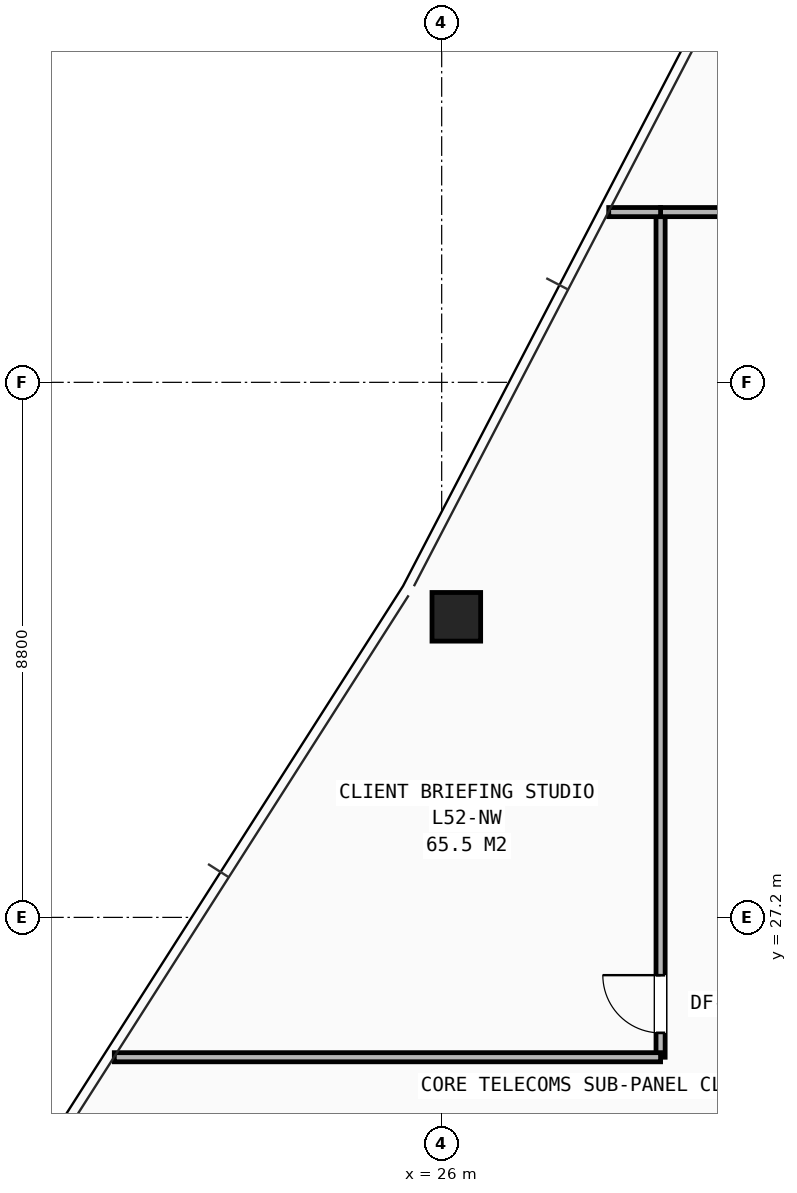
"""IFC4 building model, lengths in metres.
Left out: names, types, materials, properties, quantities, classifications, styles, units other than length and angle.
Written with IfcOpenShell. Run it as: python <this file> out.ifc"""

import sys

from ifc_helpers import new_model, si_unit, direction, frame, frame_2d, origin, origin_2d, place, context, subcontext, project, spatial, rectangle, hollow_rectangle, extrude, element, fill, save


model = new_model("IFC4")
c1 = context("Model", 3, precision=1e-05, world=origin(), true_north=direction((0.0, 1.0)))
c2 = subcontext(c1, "Body", "Model", "MODEL_VIEW")
j1 = project(units=[si_unit("LENGTHUNIT", "METRE"), si_unit("PLANEANGLEUNIT", "RADIAN")], contexts=[c1])
p1 = place(None, origin())
s1 = spatial("IfcSite", under=j1, at=p1, CompositionType="ELEMENT")
p2 = place(p1, origin())
s2 = spatial("IfcBuilding", under=s1, at=p2, CompositionType="ELEMENT")
p3 = place(p2, frame((0.0, 0.0, 182.7)))
s3 = spatial("IfcBuildingStorey", under=s2, at=p3, CompositionType="ELEMENT", Elevation=182.7)
p4 = place(p3, frame((26.241, 32.144, 0.0), z_axis=(0.0, 0.0, 1.0), x_axis=(1.0, 0.0, 0.0)))
e1 = element("IfcColumn", 1, at=p4, inside=s3, PredefinedType="COLUMN", context=c2, shape_type="SweptSolid", body=[
    extrude(hollow_rectangle(XDim=0.8, YDim=0.8, WallThickness=0.055, at=origin_2d()), origin(), (0.0, 0.0, 1.0), 3.45),
])
p5 = place(p3, frame((29.6, 24.9, 0.0), z_axis=(0.0, 0.0, 1.0), x_axis=(0.0, 1.0, 0.0)))
e2 = element("IfcWall", 2, at=p5, inside=s3, PredefinedType="PARTITIONING", context=c2, shape_type="SweptSolid", body=[
    extrude(rectangle(XDim=13.9, YDim=0.15, at=frame_2d((6.95, 0.0))), origin(), (0.0, 0.0, 1.0), 2.252),
])
p6 = place(p5, frame((0.4, 0.0, 0.0)))
e3 = element("IfcOpeningElement", 3, at=p6, cuts=e2, PredefinedType="OPENING", context=c2, shape_type="SweptSolid", body=[
    extrude(rectangle(XDim=0.95, YDim=2.1, at=frame_2d((0.475, 1.05))), frame((0.0, 0.085, 0.0), z_axis=(0.0, -1.0, 0.0), x_axis=(1.0, 0.0, 0.0)), (0.0, 0.0, 1.0), 0.17),
])
p7 = place(p3, frame((29.6, 38.8, 0.0), z_axis=(0.0, 0.0, 1.0), x_axis=(1.0, 0.0, 0.0)))
e4 = element("IfcWall", 4, at=p7, inside=s3, PredefinedType="PARTITIONING", context=c2, shape_type="SweptSolid", body=[
    extrude(rectangle(XDim=2.2, YDim=0.15, at=frame_2d((1.1, 0.0))), origin(), (0.0, 0.0, 1.0), 2.589),
])
p8 = place(p3, frame((20.616, 24.9, 0.0), z_axis=(0.0, 0.0, 1.0), x_axis=(1.0, 0.0, 0.0)))
e5 = element("IfcWall", 5, at=p8, inside=s3, PredefinedType="PARTITIONING", context=c2, shape_type="SweptSolid", body=[
    extrude(rectangle(XDim=8.984, YDim=0.15, at=frame_2d((4.492, 0.0))), origin(), (0.0, 0.0, 1.0), 2.589),
])
p9 = place(p3, frame((28.747, 38.8, 0.0), z_axis=(0.0, 0.0, 1.0), x_axis=(1.0, 0.0, 0.0)))
e6 = element("IfcWall", 6, at=p9, inside=s3, PredefinedType="PARTITIONING", context=c2, shape_type="SweptSolid", body=[
    extrude(rectangle(XDim=0.853, YDim=0.15, at=frame_2d((0.427, 0.0))), origin(), (0.0, 0.0, 1.0), 2.589),
])
p10 = place(p6, origin())
e7 = element("IfcDoor", 7, at=p10, inside=s3, OperationType="SINGLE_SWING_RIGHT", PredefinedType="DOOR", context=c2, shape_type="SweptSolid", body=[
    extrude(rectangle(XDim=0.95, YDim=2.1, at=frame_2d((0.475, 1.05))), frame((0.0, 0.025, 0.0), z_axis=(0.0, -1.0, 0.0), x_axis=(1.0, 0.0, 0.0)), (0.0, 0.0, 1.0), 0.05),
])
fill(e3, e7)
save(model, sys.argv[1])
